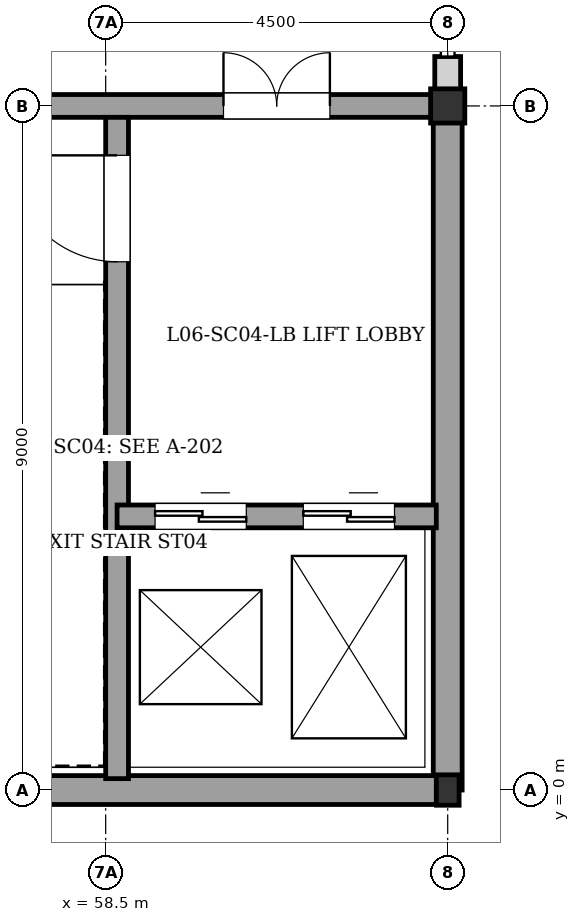
"""IFC4 building model, lengths in metres.
Left out: names, types, materials, properties, quantities, classifications, styles, units other than length and angle.
Written with IfcOpenShell. Run it as: python <this file> out.ifc"""

import sys

from ifc_helpers import new_model, si_unit, direction, frame, frame_2d, origin, origin_2d, place, context, subcontext, project, spatial, rectangle, i_section, extrude, element, fill, save


model = new_model("IFC4")
c1 = context("Model", 3, precision=1e-05, world=origin(), true_north=direction((0.0, 1.0)))
c2 = subcontext(c1, "Body", "Model", "MODEL_VIEW")
j1 = project(units=[si_unit("LENGTHUNIT", "METRE"), si_unit("PLANEANGLEUNIT", "RADIAN")], contexts=[c1])
p1 = place(None, origin())
s1 = spatial("IfcSite", under=j1, at=p1, CompositionType="ELEMENT")
p2 = place(p1, origin())
s2 = spatial("IfcBuilding", under=s1, at=p2, CompositionType="ELEMENT")
p3 = place(p2, frame((0.0, 0.0, 20.64)))
s3 = spatial("IfcBuildingStorey", under=s2, at=p3, CompositionType="ELEMENT", Elevation=20.64)
p4 = place(p3, frame((63.0, 0.0, 0.0), z_axis=(0.0, 0.0, 1.0), x_axis=(1.0, 0.0, 0.0)))
e1 = element("IfcColumn", 1, at=p4, inside=s3, PredefinedType="COLUMN", context=c2, shape_type="SweptSolid", body=[
    extrude(i_section(OverallWidth=0.3, OverallDepth=0.4, WebThickness=0.013, FlangeThickness=0.024, at=origin_2d()), origin(), (0.0, 0.0, 1.0), 3.04),
])
p5 = place(p3, frame((63.0, 9.0, 0.0), z_axis=(0.0, 0.0, 1.0), x_axis=(1.0, 0.0, 0.0)))
e2 = element("IfcColumn", 2, at=p5, inside=s3, PredefinedType="COLUMN", context=c2, shape_type="SweptSolid", body=[
    extrude(rectangle(XDim=0.45, YDim=0.45, at=origin_2d()), origin(), (0.0, 0.0, 1.0), 3.04),
])
p6 = place(p3, frame((63.0, 9.65, 0.0), z_axis=(0.0, 0.0, 1.0), x_axis=(0.0, -1.0, 0.0)))
e3 = element("IfcWall", 3, at=p6, inside=s3, PredefinedType="SOLIDWALL", context=c2, shape_type="SweptSolid", body=[
    extrude(rectangle(XDim=0.52, YDim=0.34, at=frame_2d((0.26, 0.0))), origin(), (0.0, 0.0, 1.0), 2.39),
])
for number, where, z_axis, x_axis in (
    (4, (63.0, 9.0, 0.0), (0.0, 0.0, 1.0), (0.0, -1.0, 0.0)),
    (5, (63.0, 0.0, 0.0), (0.0, 0.0, 1.0), (-1.0, 0.0, 0.0)),
):
    element("IfcWall", number, at=place(p3, frame(where, z_axis=z_axis, x_axis=x_axis)), inside=s3, PredefinedType="SOLIDWALL", context=c2, shape_type="SweptSolid", body=[
        extrude(rectangle(XDim=9.0, YDim=0.38, at=frame_2d((4.5, 0.0))), origin(), (0.0, 0.0, 1.0), 2.82),
    ])
p7 = place(p3, frame((54.0, 9.0, 0.0), z_axis=(0.0, 0.0, 1.0), x_axis=(1.0, 0.0, 0.0)))
e6 = element("IfcWall", 6, at=p7, inside=s3, PredefinedType="SHEAR", context=c2, shape_type="SweptSolid", body=[
    extrude(rectangle(XDim=9.0, YDim=0.3, at=frame_2d((4.5, 0.0))), origin(), (0.0, 0.0, 1.0), 2.82),
])
p8 = place(p7, frame((6.05, 0.0, 0.0)))
e7 = element("IfcOpeningElement", 7, at=p8, cuts=e6, PredefinedType="OPENING", context=c2, shape_type="SweptSolid", body=[
    extrude(rectangle(XDim=1.4, YDim=2.02, at=frame_2d((0.7, 1.01))), frame((0.0, 0.16, 0.0), z_axis=(0.0, -1.0, 0.0), x_axis=(1.0, 0.0, 0.0)), (0.0, 0.0, 1.0), 0.32),
])
p9 = place(p3, frame((58.65, 0.15, 0.0), z_axis=(0.0, 0.0, 1.0), x_axis=(0.0, 1.0, 0.0)))
e8 = element("IfcWall", 8, at=p9, inside=s3, PredefinedType="SHEAR", context=c2, shape_type="SweptSolid", body=[
    extrude(rectangle(XDim=8.7, YDim=0.3, at=frame_2d((4.35, 0.0))), origin(), (0.0, 0.0, 1.0), 2.82),
])
p10 = place(p9, frame((6.8, 0.0, 0.0)))
e9 = element("IfcOpeningElement", 9, at=p10, cuts=e8, PredefinedType="OPENING", context=c2, shape_type="SweptSolid", body=[
    extrude(rectangle(XDim=1.4, YDim=2.02, at=frame_2d((0.7, 1.01))), frame((0.0, 0.16, 0.0), z_axis=(0.0, -1.0, 0.0), x_axis=(1.0, 0.0, 0.0)), (0.0, 0.0, 1.0), 0.32),
])
p11 = place(p3, frame((58.65, 3.6, 0.0), z_axis=(0.0, 0.0, 1.0), x_axis=(1.0, 0.0, 0.0)))
e10 = element("IfcWall", 10, at=p11, inside=s3, PredefinedType="SHEAR", context=c2, shape_type="SweptSolid", body=[
    extrude(rectangle(XDim=4.2, YDim=0.3, at=frame_2d((2.1, 0.0))), origin(), (0.0, 0.0, 1.0), 2.82),
])
p12 = place(p11, frame((0.5, 0.0, 0.0)))
e11 = element("IfcOpeningElement", 11, at=p12, cuts=e10, PredefinedType="OPENING", context=c2, shape_type="SweptSolid", body=[
    extrude(rectangle(XDim=1.2, YDim=2.2, at=frame_2d((0.6, 1.1))), frame((0.0, 0.16, 0.0), z_axis=(0.0, -1.0, 0.0), x_axis=(1.0, 0.0, 0.0)), (0.0, 0.0, 1.0), 0.32),
])
p13 = place(p11, frame((2.45, 0.0, 0.0)))
e12 = element("IfcOpeningElement", 12, at=p13, cuts=e10, PredefinedType="OPENING", context=c2, shape_type="SweptSolid", body=[
    extrude(rectangle(XDim=1.2, YDim=2.2, at=frame_2d((0.6, 1.1))), frame((0.0, 0.16, 0.0), z_axis=(0.0, -1.0, 0.0), x_axis=(1.0, 0.0, 0.0)), (0.0, 0.0, 1.0), 0.32),
])
p14 = place(p8, origin())
e13 = element("IfcDoor", 13, at=p14, inside=s3, OperationType="DOUBLE_DOOR_SINGLE_SWING", PredefinedType="DOOR", context=c2, shape_type="SweptSolid", body=[
    extrude(rectangle(XDim=1.4, YDim=2.02, at=frame_2d((0.7, 1.01))), frame((0.0, 0.025, 0.0), z_axis=(0.0, -1.0, 0.0), x_axis=(1.0, 0.0, 0.0)), (0.0, 0.0, 1.0), 0.05),
])
fill(e7, e13)
p15 = place(p10, origin())
e14 = element("IfcDoor", 14, at=p15, inside=s3, OperationType="SINGLE_SWING_RIGHT", PredefinedType="DOOR", context=c2, shape_type="SweptSolid", body=[
    extrude(rectangle(XDim=1.4, YDim=2.02, at=frame_2d((0.7, 1.01))), frame((0.0, 0.025, 0.0), z_axis=(0.0, -1.0, 0.0), x_axis=(1.0, 0.0, 0.0)), (0.0, 0.0, 1.0), 0.05),
])
fill(e9, e14)
p16 = place(p12, origin())
e15 = element("IfcDoor", 15, at=p16, inside=s3, OperationType="DOUBLE_DOOR_SLIDING", PredefinedType="DOOR", context=c2, shape_type="SweptSolid", body=[
    extrude(rectangle(XDim=1.2, YDim=2.2, at=frame_2d((0.6, 1.1))), frame((0.0, 0.025, 0.0), z_axis=(0.0, -1.0, 0.0), x_axis=(1.0, 0.0, 0.0)), (0.0, 0.0, 1.0), 0.05),
])
fill(e11, e15)
p17 = place(p13, origin())
e16 = element("IfcDoor", 16, at=p17, inside=s3, OperationType="DOUBLE_DOOR_SLIDING", PredefinedType="DOOR", context=c2, shape_type="SweptSolid", body=[
    extrude(rectangle(XDim=1.2, YDim=2.2, at=frame_2d((0.6, 1.1))), frame((0.0, 0.025, 0.0), z_axis=(0.0, -1.0, 0.0), x_axis=(1.0, 0.0, 0.0)), (0.0, 0.0, 1.0), 0.05),
])
fill(e12, e16)
save(model, sys.argv[1])
